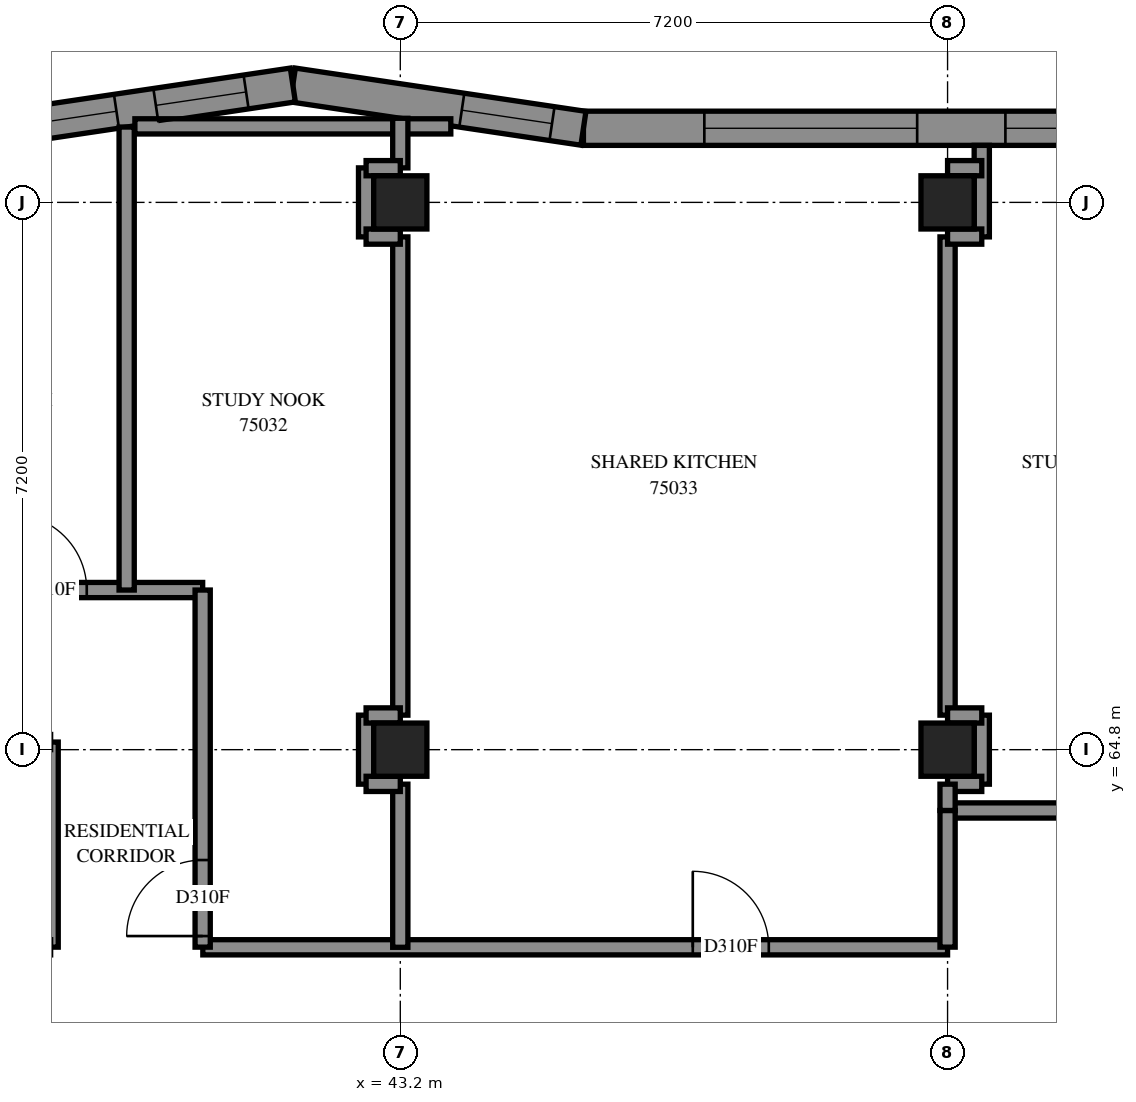
"""IFC4 building model, lengths in metres.
Left out: names, types, materials, properties, quantities, classifications, styles, units other than length and angle.
Written with IfcOpenShell. Run it as: python <this file> out.ifc"""

import sys

from ifc_helpers import new_model, si_unit, direction, frame, frame_2d, origin, origin_2d, place, context, subcontext, project, spatial, polyline, rectangle, outline, extrude, element, fill, save


model = new_model("IFC4")
c1 = context("Model", 3, precision=1e-05, world=origin(), true_north=direction((0.0, 1.0)))
c2 = subcontext(c1, "Body", "Model", "MODEL_VIEW")
j1 = project(units=[si_unit("LENGTHUNIT", "METRE"), si_unit("PLANEANGLEUNIT", "RADIAN")], contexts=[c1])
p1 = place(None, origin())
s1 = spatial("IfcSite", under=j1, at=p1, CompositionType="ELEMENT")
p2 = place(p1, origin())
s2 = spatial("IfcBuilding", under=s1, at=p2, CompositionType="ELEMENT")
p3 = place(p2, frame((0.0, 0.0, 274.4)))
s3 = spatial("IfcBuildingStorey", under=s2, at=p3, CompositionType="ELEMENT", Elevation=274.4)
for number, where, z_axis, x_axis in (
    (1, (43.2, 64.8, 0.0), (0.0, 0.0, 1.0), (1.0, 0.0, 0.0)),
    (2, (43.2, 72.0, 0.0), (0.0, 0.0, 1.0), (1.0, 0.0, 0.0)),
    (3, (50.4, 64.8, 0.0), (0.0, 0.0, 1.0), (1.0, 0.0, 0.0)),
    (4, (50.4, 72.0, 0.0), (0.0, 0.0, 1.0), (1.0, 0.0, 0.0)),
):
    element("IfcColumn", number, at=place(p3, frame(where, z_axis=z_axis, x_axis=x_axis)), inside=s3, PredefinedType="COLUMN", context=c2, shape_type="SweptSolid", body=[
        extrude(rectangle(XDim=0.7, YDim=0.7, at=origin_2d()), origin(), (0.0, 0.0, 1.0), 3.1),
    ])
p4 = place(p3, frame((53.322, 72.975, 0.0), z_axis=(0.0, 0.0, 1.0), x_axis=(-1.0, 0.0, 0.0)))
e5 = element("IfcWall", 5, at=p4, inside=s3, PredefinedType="SOLIDWALL", context=c2, shape_type="SweptSolid", body=[
    extrude(outline(polyline([(0.017, -0.225), (7.696, -0.225), (7.729, 0.225), (-0.017, 0.225), (0.017, -0.225)])), origin(), (0.0, 0.0, 1.0), 3.1),
])
p5 = place(p4, frame((3.322, 0.0, 0.45)))
e6 = element("IfcOpeningElement", 6, at=p5, cuts=e5, PredefinedType="OPENING", context=c2, shape_type="SweptSolid", body=[
    extrude(rectangle(XDim=2.8, YDim=2.55, at=frame_2d((1.4, 1.275))), frame((0.0, 0.235, 0.0), z_axis=(0.0, -1.0, 0.0), x_axis=(1.0, 0.0, 0.0)), (0.0, 0.0, 1.0), 0.47),
])
p6 = place(p4, frame((0.961, 0.0, 0.45)))
e7 = element("IfcOpeningElement", 7, at=p6, cuts=e5, PredefinedType="OPENING", context=c2, shape_type="SweptSolid", body=[
    extrude(rectangle(XDim=1.2, YDim=2.55, at=frame_2d((0.6, 1.275))), frame((0.0, 0.235, 0.0), z_axis=(0.0, -1.0, 0.0), x_axis=(1.0, 0.0, 0.0)), (0.0, 0.0, 1.0), 0.47),
])
p7 = place(p3, frame((45.609, 72.975, 0.0), z_axis=(0.0, 0.0, 1.0), x_axis=(-0.9890857661, 0.1473409217, 0.0)))
e8 = element("IfcWall", 8, at=p7, inside=s3, PredefinedType="SOLIDWALL", context=c2, shape_type="SweptSolid", body=[
    extrude(outline(polyline([(0.017, -0.225), (3.899, -0.225), (3.832, 0.225), (-0.017, 0.225), (0.017, -0.225)])), origin(), (0.0, 0.0, 1.0), 3.1),
])
p8 = place(p7, frame((0.418, 0.0, 0.45)))
e9 = element("IfcOpeningElement", 9, at=p8, cuts=e8, PredefinedType="OPENING", context=c2, shape_type="SweptSolid", body=[
    extrude(rectangle(XDim=1.2, YDim=2.55, at=frame_2d((0.6, 1.275))), frame((0.0, 0.235, 0.0), z_axis=(0.0, -1.0, 0.0), x_axis=(1.0, 0.0, 0.0)), (0.0, 0.0, 1.0), 0.47),
])
p9 = place(p3, frame((41.786, 73.544, 0.0), z_axis=(0.0, 0.0, 1.0), x_axis=(-0.9890847468, -0.1473477641, 0.0)))
e10 = element("IfcWall", 10, at=p9, inside=s3, PredefinedType="SOLIDWALL", context=c2, shape_type="SweptSolid", body=[
    extrude(outline(polyline([(-0.034, -0.225), (3.849, -0.225), (3.916, 0.225), (0.034, 0.225), (-0.034, -0.225)])), origin(), (0.0, 0.0, 1.0), 3.1),
])
p10 = place(p9, frame((0.622, 0.0, 0.45)))
e11 = element("IfcOpeningElement", 11, at=p10, cuts=e10, PredefinedType="OPENING", context=c2, shape_type="SweptSolid", body=[
    extrude(rectangle(XDim=1.2, YDim=2.55, at=frame_2d((0.6, 1.275))), frame((0.0, 0.235, 0.0), z_axis=(0.0, -1.0, 0.0), x_axis=(1.0, 0.0, 0.0)), (0.0, 0.0, 1.0), 0.47),
])
p11 = place(p9, frame((2.346, 0.0, 0.45)))
e12 = element("IfcOpeningElement", 12, at=p11, cuts=e10, PredefinedType="OPENING", context=c2, shape_type="SweptSolid", body=[
    extrude(rectangle(XDim=1.2, YDim=2.55, at=frame_2d((0.6, 1.275))), frame((0.0, 0.235, 0.0), z_axis=(0.0, -1.0, 0.0), x_axis=(1.0, 0.0, 0.0)), (0.0, 0.0, 1.0), 0.47),
])
p12 = place(p3, frame((28.8, 66.9, 0.0), z_axis=(0.0, 0.0, 1.0), x_axis=(1.0, 0.0, 0.0)))
e13 = element("IfcWall", 13, at=p12, inside=s3, PredefinedType="PARTITIONING", context=c2, shape_type="SweptSolid", body=[
    extrude(rectangle(XDim=11.8, YDim=0.2, at=frame_2d((5.9, 0.0))), origin(), (0.0, 0.0, 1.0), 3.1),
])
p13 = place(p12, frame((2.075, 0.0, 0.0)))
e14 = element("IfcOpeningElement", 14, at=p13, cuts=e13, PredefinedType="OPENING", context=c2, shape_type="SweptSolid", body=[
    extrude(rectangle(XDim=1.0, YDim=2.1, at=frame_2d((0.5, 1.05))), frame((0.0, 0.11, 0.0), z_axis=(0.0, -1.0, 0.0), x_axis=(1.0, 0.0, 0.0)), (0.0, 0.0, 1.0), 0.22),
])
p14 = place(p12, frame((9.275, 0.0, 0.0)))
e15 = element("IfcOpeningElement", 15, at=p14, cuts=e13, PredefinedType="OPENING", context=c2, shape_type="SweptSolid", body=[
    extrude(rectangle(XDim=1.0, YDim=2.1, at=frame_2d((0.5, 1.05))), frame((0.0, 0.11, 0.0), z_axis=(0.0, -1.0, 0.0), x_axis=(1.0, 0.0, 0.0)), (0.0, 0.0, 1.0), 0.22),
])
p15 = place(p12, frame((4.28, 0.0, 0.0)))
e16 = element("IfcOpeningElement", 16, at=p15, cuts=e13, PredefinedType="OPENING", context=c2, shape_type="SweptSolid", body=[
    extrude(rectangle(XDim=1.0, YDim=2.1, at=frame_2d((0.5, 1.05))), frame((0.0, 0.11, 0.0), z_axis=(0.0, -1.0, 0.0), x_axis=(1.0, 0.0, 0.0)), (0.0, 0.0, 1.0), 0.22),
])
p16 = place(p3, frame((40.602, 62.2, 0.0), z_axis=(0.0, 0.0, 1.0), x_axis=(1.0, 0.0, 0.0)))
e17 = element("IfcWall", 17, at=p16, inside=s3, PredefinedType="PARTITIONING", context=c2, shape_type="SweptSolid", body=[
    extrude(rectangle(XDim=9.798, YDim=0.2, at=frame_2d((4.899, 0.0))), origin(), (0.0, 0.0, 1.0), 3.1),
])
p17 = place(p16, frame((6.446, 0.0, 0.0)))
e18 = element("IfcOpeningElement", 18, at=p17, cuts=e17, PredefinedType="OPENING", context=c2, shape_type="SweptSolid", body=[
    extrude(rectangle(XDim=1.0, YDim=2.1, at=frame_2d((0.5, 1.05))), frame((0.0, 0.11, 0.0), z_axis=(0.0, -1.0, 0.0), x_axis=(1.0, 0.0, 0.0)), (0.0, 0.0, 1.0), 0.22),
])
for number, where, z_axis, x_axis in (
    (19, (43.2, 65.254, 0.0), (0.0, 0.0, 1.0), (0.0, 1.0, 0.0)),
    (20, (50.4, 65.254, 0.0), (0.0, 0.0, 1.0), (0.0, 1.0, 0.0)),
):
    element("IfcWall", number, at=place(p3, frame(where, z_axis=z_axis, x_axis=x_axis)), inside=s3, PredefinedType="PARTITIONING", context=c2, shape_type="SweptSolid", body=[
        extrude(rectangle(XDim=6.292, YDim=0.2, at=frame_2d((3.146, 0.0))), origin(), (0.0, 0.0, 1.0), 3.1),
    ])
p18 = place(p3, frame((39.6, 66.9, 0.0), z_axis=(0.0, 0.0, 1.0), x_axis=(0.0, 1.0, 0.0)))
e21 = element("IfcWall", 21, at=p18, inside=s3, PredefinedType="PARTITIONING", context=c2, shape_type="SweptSolid", body=[
    extrude(rectangle(XDim=6.091, YDim=0.2, at=frame_2d((3.046, 0.0))), origin(), (0.0, 0.0, 1.0), 3.1),
])
p19 = place(p3, frame((50.4, 64.0, 0.0), z_axis=(0.0, 0.0, 1.0), x_axis=(1.0, 0.0, 0.0)))
e22 = element("IfcWall", 22, at=p19, inside=s3, PredefinedType="PARTITIONING", context=c2, shape_type="SweptSolid", body=[
    extrude(rectangle(XDim=4.8, YDim=0.2, at=frame_2d((2.4, 0.0))), origin(), (0.0, 0.0, 1.0), 3.1),
])
p20 = place(p19, frame((2.033, 0.0, 0.0)))
e23 = element("IfcOpeningElement", 23, at=p20, cuts=e22, PredefinedType="OPENING", context=c2, shape_type="SweptSolid", body=[
    extrude(rectangle(XDim=1.0, YDim=2.1, at=frame_2d((0.5, 1.05))), frame((0.0, 0.11, 0.0), z_axis=(0.0, -1.0, 0.0), x_axis=(1.0, 0.0, 0.0)), (0.0, 0.0, 1.0), 0.22),
])
p21 = place(p3, frame((40.6, 62.202, 0.0), z_axis=(0.0, 0.0, 1.0), x_axis=(0.0, 1.0, 0.0)))
e24 = element("IfcWall", 24, at=p21, inside=s3, PredefinedType="PARTITIONING", context=c2, shape_type="SweptSolid", body=[
    extrude(rectangle(XDim=4.698, YDim=0.2, at=frame_2d((2.349, 0.0))), origin(), (0.0, 0.0, 1.0), 3.1),
])
p22 = place(p21, frame((0.146, 0.0, 0.0)))
e25 = element("IfcOpeningElement", 25, at=p22, cuts=e24, PredefinedType="OPENING", context=c2, shape_type="SweptSolid", body=[
    extrude(rectangle(XDim=1.0, YDim=2.1, at=frame_2d((0.5, 1.05))), frame((0.0, 0.11, 0.0), z_axis=(0.0, -1.0, 0.0), x_axis=(1.0, 0.0, 0.0)), (0.0, 0.0, 1.0), 0.22),
])
p23 = place(p3, frame((39.708, 73.0, 0.0), z_axis=(0.0, 0.0, 1.0), x_axis=(1.0, 0.0, 0.0)))
e26 = element("IfcWall", 26, at=p23, inside=s3, PredefinedType="PARTITIONING", context=c2, shape_type="SweptSolid", body=[
    extrude(rectangle(XDim=4.156, YDim=0.2, at=frame_2d((2.078, 0.0))), origin(), (0.0, 0.0, 1.0), 3.1),
])
p24 = place(p3, frame((38.6, 62.202, 0.0), z_axis=(0.0, 0.0, 1.0), x_axis=(0.0, 1.0, 0.0)))
e27 = element("IfcWall", 27, at=p24, inside=s3, PredefinedType="PARTITIONING", context=c2, shape_type="SweptSolid", body=[
    extrude(rectangle(XDim=2.698, YDim=0.2, at=frame_2d((1.349, 0.0))), origin(), (0.0, 0.0, 1.0), 3.1),
])
p25 = place(p3, frame((43.2, 62.2, 0.0), z_axis=(0.0, 0.0, 1.0), x_axis=(0.0, 1.0, 0.0)))
e28 = element("IfcWall", 28, at=p25, inside=s3, PredefinedType="PARTITIONING", context=c2, shape_type="SweptSolid", body=[
    extrude(rectangle(XDim=2.146, YDim=0.2, at=frame_2d((1.073, 0.0))), origin(), (0.0, 0.0, 1.0), 3.1),
])
p26 = place(p3, frame((50.4, 62.202, 0.0), z_axis=(0.0, 0.0, 1.0), x_axis=(0.0, 1.0, 0.0)))
e29 = element("IfcWall", 29, at=p26, inside=s3, PredefinedType="PARTITIONING", context=c2, shape_type="SweptSolid", body=[
    extrude(rectangle(XDim=1.798, YDim=0.2, at=frame_2d((0.899, 0.0))), origin(), (0.0, 0.0, 1.0), 3.1),
])
for number, where, z_axis, x_axis in (
    (30, (42.75, 64.346, 0.0), (0.0, 0.0, 1.0), (0.0, 1.0, 0.0)),
    (31, (50.85, 64.346, 0.0), (0.0, 0.0, 1.0), (0.0, 1.0, 0.0)),
    (32, (42.75, 71.546, 0.0), (0.0, 0.0, 1.0), (0.0, 1.0, 0.0)),
):
    element("IfcWall", number, at=place(p3, frame(where, z_axis=z_axis, x_axis=x_axis)), inside=s3, PredefinedType="PARTITIONING", context=c2, shape_type="SweptSolid", body=[
        extrude(rectangle(XDim=0.908, YDim=0.2, at=frame_2d((0.454, 0.0))), origin(), (0.0, 0.0, 1.0), 3.1),
    ])
p27 = place(p3, frame((50.85, 71.546, 0.0), z_axis=(0.0, 0.0, 1.0), x_axis=(0.0, 1.0, 0.0)))
e33 = element("IfcWall", 33, at=p27, inside=s3, PredefinedType="PARTITIONING", context=c2, shape_type="SweptSolid", body=[
    extrude(rectangle(XDim=1.204, YDim=0.2, at=frame_2d((0.602, 0.0))), origin(), (0.0, 0.0, 1.0), 3.1),
])
p28 = place(p3, frame((43.2, 72.454, 0.0), z_axis=(0.0, 0.0, 1.0), x_axis=(0.0, 1.0, 0.0)))
e34 = element("IfcWall", 34, at=p28, inside=s3, PredefinedType="PARTITIONING", context=c2, shape_type="SweptSolid", body=[
    extrude(rectangle(XDim=0.652, YDim=0.2, at=frame_2d((0.326, 0.0))), origin(), (0.0, 0.0, 1.0), 3.1),
])
for number, where, z_axis, x_axis in (
    (35, (42.75, 71.55, 0.0), (0.0, 0.0, 1.0), (1.0, 0.0, 0.0)),
    (36, (50.4, 71.55, 0.0), (0.0, 0.0, 1.0), (1.0, 0.0, 0.0)),
    (37, (42.75, 72.45, 0.0), (0.0, 0.0, 1.0), (1.0, 0.0, 0.0)),
    (38, (50.4, 72.45, 0.0), (0.0, 0.0, 1.0), (1.0, 0.0, 0.0)),
    (39, (42.75, 65.25, 0.0), (0.0, 0.0, 1.0), (1.0, 0.0, 0.0)),
    (40, (50.4, 65.25, 0.0), (0.0, 0.0, 1.0), (1.0, 0.0, 0.0)),
    (41, (42.75, 64.35, 0.0), (0.0, 0.0, 1.0), (1.0, 0.0, 0.0)),
    (42, (50.4, 64.35, 0.0), (0.0, 0.0, 1.0), (1.0, 0.0, 0.0)),
):
    element("IfcWall", number, at=place(p3, frame(where, z_axis=z_axis, x_axis=x_axis)), inside=s3, PredefinedType="PARTITIONING", context=c2, shape_type="SweptSolid", body=[
        extrude(rectangle(XDim=0.45, YDim=0.2, at=frame_2d((0.225, 0.0))), origin(), (0.0, 0.0, 1.0), 3.1),
    ])
p29 = place(p3, frame((50.4, 64.0, 0.0), z_axis=(0.0, 0.0, 1.0), x_axis=(0.0, 1.0, 0.0)))
e43 = element("IfcWall", 43, at=p29, inside=s3, PredefinedType="PARTITIONING", context=c2, shape_type="SweptSolid", body=[
    extrude(rectangle(XDim=0.346, YDim=0.2, at=frame_2d((0.173, 0.0))), origin(), (0.0, 0.0, 1.0), 3.1),
])
p30 = place(p5, origin())
e44 = element("IfcWindow", 44, at=p30, inside=s3, PartitioningType="SINGLE_PANEL", PredefinedType="WINDOW", context=c2, shape_type="SweptSolid", body=[
    extrude(rectangle(XDim=2.8, YDim=2.55, at=frame_2d((1.4, 1.275))), frame((0.0, 0.205, 0.0), z_axis=(0.0, -1.0, 0.0), x_axis=(1.0, 0.0, 0.0)), (0.0, 0.0, 1.0), 0.06),
])
fill(e6, e44)
p31 = place(p6, origin())
e45 = element("IfcWindow", 45, at=p31, inside=s3, PartitioningType="SINGLE_PANEL", PredefinedType="WINDOW", context=c2, shape_type="SweptSolid", body=[
    extrude(rectangle(XDim=1.2, YDim=2.55, at=frame_2d((0.6, 1.275))), frame((0.0, 0.205, 0.0), z_axis=(0.0, -1.0, 0.0), x_axis=(1.0, 0.0, 0.0)), (0.0, 0.0, 1.0), 0.06),
])
fill(e7, e45)
p32 = place(p8, origin())
e46 = element("IfcWindow", 46, at=p32, inside=s3, PartitioningType="SINGLE_PANEL", PredefinedType="WINDOW", context=c2, shape_type="SweptSolid", body=[
    extrude(rectangle(XDim=1.2, YDim=2.55, at=frame_2d((0.6, 1.275))), frame((0.0, 0.205, 0.0), z_axis=(0.0, -1.0, 0.0), x_axis=(1.0, 0.0, 0.0)), (0.0, 0.0, 1.0), 0.06),
])
fill(e9, e46)
p33 = place(p10, origin())
e47 = element("IfcWindow", 47, at=p33, inside=s3, PartitioningType="SINGLE_PANEL", PredefinedType="WINDOW", context=c2, shape_type="SweptSolid", body=[
    extrude(rectangle(XDim=1.2, YDim=2.55, at=frame_2d((0.6, 1.275))), frame((0.0, 0.145, 0.0), z_axis=(0.0, -1.0, 0.0), x_axis=(1.0, 0.0, 0.0)), (0.0, 0.0, 1.0), 0.06),
])
fill(e11, e47)
p34 = place(p11, origin())
e48 = element("IfcWindow", 48, at=p34, inside=s3, PartitioningType="SINGLE_PANEL", PredefinedType="WINDOW", context=c2, shape_type="SweptSolid", body=[
    extrude(rectangle(XDim=1.2, YDim=2.55, at=frame_2d((0.6, 1.275))), frame((0.0, 0.175, 0.0), z_axis=(0.0, -1.0, 0.0), x_axis=(1.0, 0.0, 0.0)), (0.0, 0.0, 1.0), 0.06),
])
fill(e12, e48)
p35 = place(p14, origin())
e49 = element("IfcDoor", 49, at=p35, inside=s3, OperationType="SINGLE_SWING_RIGHT", PredefinedType="DOOR", context=c2, shape_type="SweptSolid", body=[
    extrude(rectangle(XDim=1.0, YDim=2.1, at=frame_2d((0.5, 1.05))), frame((0.0, 0.025, 0.0), z_axis=(0.0, -1.0, 0.0), x_axis=(1.0, 0.0, 0.0)), (0.0, 0.0, 1.0), 0.05),
])
fill(e15, e49)
p36 = place(p22, origin())
e50 = element("IfcDoor", 50, at=p36, inside=s3, OperationType="SINGLE_SWING_LEFT", PredefinedType="DOOR", context=c2, shape_type="SweptSolid", body=[
    extrude(rectangle(XDim=1.0, YDim=2.1, at=frame_2d((0.5, 1.05))), frame((0.0, 0.025, 0.0), z_axis=(0.0, -1.0, 0.0), x_axis=(1.0, 0.0, 0.0)), (0.0, 0.0, 1.0), 0.05),
])
fill(e25, e50)
p37 = place(p17, origin())
e51 = element("IfcDoor", 51, at=p37, inside=s3, OperationType="SINGLE_SWING_RIGHT", PredefinedType="DOOR", context=c2, shape_type="SweptSolid", body=[
    extrude(rectangle(XDim=1.0, YDim=2.1, at=frame_2d((0.5, 1.05))), frame((0.0, 0.025, 0.0), z_axis=(0.0, -1.0, 0.0), x_axis=(1.0, 0.0, 0.0)), (0.0, 0.0, 1.0), 0.05),
])
fill(e18, e51)
save(model, sys.argv[1])
